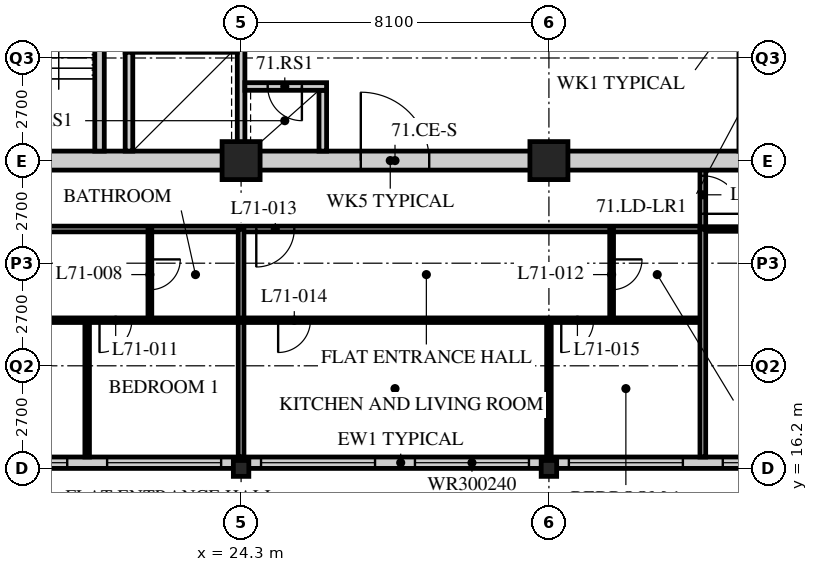
"""IFC4 building model, lengths in metres.
Left out: names, types, materials, properties, quantities, classifications, styles, units other than length and angle.
Written with IfcOpenShell. Run it as: python <this file> out.ifc"""

import sys

from ifc_helpers import new_model, si_unit, direction, frame, frame_2d, origin, origin_2d, place, context, subcontext, project, spatial, rectangle, hollow_rectangle, i_section, extrude, element, fill, save


model = new_model("IFC4")
c1 = context("Model", 3, precision=1e-05, world=origin(), true_north=direction((0.0, 1.0)))
c2 = subcontext(c1, "Body", "Model", "MODEL_VIEW")
j1 = project(units=[si_unit("LENGTHUNIT", "METRE"), si_unit("PLANEANGLEUNIT", "RADIAN")], contexts=[c1])
p1 = place(None, origin())
s1 = spatial("IfcSite", under=j1, at=p1, CompositionType="ELEMENT")
p2 = place(p1, origin())
s2 = spatial("IfcBuilding", under=s1, at=p2, CompositionType="ELEMENT")
p3 = place(p2, frame((0.0, 0.0, 277.5)))
s3 = spatial("IfcBuildingStorey", under=s2, at=p3, CompositionType="ELEMENT", Elevation=277.5)
p4 = place(p3, frame((24.3, 16.2, 0.0), z_axis=(0.0, 0.0, 1.0), x_axis=(1.0, 0.0, 0.0)))
e1 = element("IfcColumn", 1, at=p4, inside=s3, PredefinedType="COLUMN", context=c2, shape_type="SweptSolid", body=[
    extrude(i_section(OverallWidth=0.407, OverallDepth=0.419, WebThickness=0.031, FlangeThickness=0.049, FilletRadius=0.015, at=origin_2d()), origin(), (0.0, 0.0, 1.0), 3.9),
])
p5 = place(p3, frame((24.3, 24.3, 0.0), z_axis=(0.0, 0.0, 1.0), x_axis=(1.0, 0.0, 0.0)))
e2 = element("IfcColumn", 2, at=p5, inside=s3, PredefinedType="COLUMN", context=c2, shape_type="SweptSolid", body=[
    extrude(hollow_rectangle(XDim=1.0, YDim=1.0, WallThickness=0.1, at=origin_2d()), origin(), (0.0, 0.0, 1.0), 3.9),
])
p6 = place(p3, frame((32.4, 16.2, 0.0), z_axis=(0.0, 0.0, 1.0), x_axis=(1.0, 0.0, 0.0)))
e3 = element("IfcColumn", 3, at=p6, inside=s3, PredefinedType="COLUMN", context=c2, shape_type="SweptSolid", body=[
    extrude(i_section(OverallWidth=0.407, OverallDepth=0.419, WebThickness=0.031, FlangeThickness=0.049, FilletRadius=0.015, at=origin_2d()), origin(), (0.0, 0.0, 1.0), 3.9),
])
p7 = place(p3, frame((32.4, 24.3, 0.0), z_axis=(0.0, 0.0, 1.0), x_axis=(1.0, 0.0, 0.0)))
e4 = element("IfcColumn", 4, at=p7, inside=s3, PredefinedType="COLUMN", context=c2, shape_type="SweptSolid", body=[
    extrude(hollow_rectangle(XDim=1.0, YDim=1.0, WallThickness=0.1, at=origin_2d()), origin(), (0.0, 0.0, 1.0), 3.9),
])
p8 = place(p3, frame((8.4, 16.35, 0.0), z_axis=(0.0, 0.0, 1.0), x_axis=(1.0, 0.0, 0.0)))
e5 = element("IfcWall", 5, at=p8, inside=s3, PredefinedType="SOLIDWALL", context=c2, shape_type="SweptSolid", body=[
    extrude(rectangle(XDim=40.2, YDim=0.3, at=frame_2d((20.1, 0.0))), origin(), (0.0, 0.0, 1.0), 3.69),
])
p9 = place(p8, frame((0.225, 0.0, 0.6)))
e6 = element("IfcOpeningElement", 6, at=p9, cuts=e5, PredefinedType="OPENING", context=c2, shape_type="SweptSolid", body=[
    extrude(rectangle(XDim=3.0, YDim=2.4, at=frame_2d((1.5, 1.2))), frame((0.0, 0.16, 0.0), z_axis=(0.0, -1.0, 0.0), x_axis=(1.0, 0.0, 0.0)), (0.0, 0.0, 1.0), 0.32),
])
p10 = place(p8, frame((4.275, 0.0, 0.6)))
e7 = element("IfcOpeningElement", 7, at=p10, cuts=e5, PredefinedType="OPENING", context=c2, shape_type="SweptSolid", body=[
    extrude(rectangle(XDim=3.0, YDim=2.4, at=frame_2d((1.5, 1.2))), frame((0.0, 0.16, 0.0), z_axis=(0.0, -1.0, 0.0), x_axis=(1.0, 0.0, 0.0)), (0.0, 0.0, 1.0), 0.32),
])
p11 = place(p8, frame((8.325, 0.0, 0.6)))
e8 = element("IfcOpeningElement", 8, at=p11, cuts=e5, PredefinedType="OPENING", context=c2, shape_type="SweptSolid", body=[
    extrude(rectangle(XDim=3.0, YDim=2.4, at=frame_2d((1.5, 1.2))), frame((0.0, 0.16, 0.0), z_axis=(0.0, -1.0, 0.0), x_axis=(1.0, 0.0, 0.0)), (0.0, 0.0, 1.0), 0.32),
])
p12 = place(p8, frame((12.375, 0.0, 0.6)))
e9 = element("IfcOpeningElement", 9, at=p12, cuts=e5, PredefinedType="OPENING", context=c2, shape_type="SweptSolid", body=[
    extrude(rectangle(XDim=3.0, YDim=2.4, at=frame_2d((1.5, 1.2))), frame((0.0, 0.16, 0.0), z_axis=(0.0, -1.0, 0.0), x_axis=(1.0, 0.0, 0.0)), (0.0, 0.0, 1.0), 0.32),
])
p13 = place(p8, frame((16.425, 0.0, 0.6)))
e10 = element("IfcOpeningElement", 10, at=p13, cuts=e5, PredefinedType="OPENING", context=c2, shape_type="SweptSolid", body=[
    extrude(rectangle(XDim=3.0, YDim=2.4, at=frame_2d((1.5, 1.2))), frame((0.0, 0.16, 0.0), z_axis=(0.0, -1.0, 0.0), x_axis=(1.0, 0.0, 0.0)), (0.0, 0.0, 1.0), 0.32),
])
p14 = place(p8, frame((20.475, 0.0, 0.6)))
e11 = element("IfcOpeningElement", 11, at=p14, cuts=e5, PredefinedType="OPENING", context=c2, shape_type="SweptSolid", body=[
    extrude(rectangle(XDim=3.0, YDim=2.4, at=frame_2d((1.5, 1.2))), frame((0.0, 0.16, 0.0), z_axis=(0.0, -1.0, 0.0), x_axis=(1.0, 0.0, 0.0)), (0.0, 0.0, 1.0), 0.32),
])
p15 = place(p8, frame((24.525, 0.0, 0.6)))
e12 = element("IfcOpeningElement", 12, at=p15, cuts=e5, PredefinedType="OPENING", context=c2, shape_type="SweptSolid", body=[
    extrude(rectangle(XDim=3.0, YDim=2.4, at=frame_2d((1.5, 1.2))), frame((0.0, 0.16, 0.0), z_axis=(0.0, -1.0, 0.0), x_axis=(1.0, 0.0, 0.0)), (0.0, 0.0, 1.0), 0.32),
])
p16 = place(p8, frame((28.575, 0.0, 0.6)))
e13 = element("IfcOpeningElement", 13, at=p16, cuts=e5, PredefinedType="OPENING", context=c2, shape_type="SweptSolid", body=[
    extrude(rectangle(XDim=3.0, YDim=2.4, at=frame_2d((1.5, 1.2))), frame((0.0, 0.16, 0.0), z_axis=(0.0, -1.0, 0.0), x_axis=(1.0, 0.0, 0.0)), (0.0, 0.0, 1.0), 0.32),
])
p17 = place(p8, frame((32.625, 0.0, 0.6)))
e14 = element("IfcOpeningElement", 14, at=p17, cuts=e5, PredefinedType="OPENING", context=c2, shape_type="SweptSolid", body=[
    extrude(rectangle(XDim=3.0, YDim=2.4, at=frame_2d((1.5, 1.2))), frame((0.0, 0.16, 0.0), z_axis=(0.0, -1.0, 0.0), x_axis=(1.0, 0.0, 0.0)), (0.0, 0.0, 1.0), 0.32),
])
p18 = place(p8, frame((36.675, 0.0, 0.6)))
e15 = element("IfcOpeningElement", 15, at=p18, cuts=e5, PredefinedType="OPENING", context=c2, shape_type="SweptSolid", body=[
    extrude(rectangle(XDim=3.0, YDim=2.4, at=frame_2d((1.5, 1.2))), frame((0.0, 0.16, 0.0), z_axis=(0.0, -1.0, 0.0), x_axis=(1.0, 0.0, 0.0)), (0.0, 0.0, 1.0), 0.32),
])
p19 = place(p3, frame((12.15, 22.5, 0.0), z_axis=(0.0, 0.0, 1.0), x_axis=(1.0, 0.0, 0.0)))
e16 = element("IfcWall", 16, at=p19, inside=s3, PredefinedType="PARTITIONING", context=c2, shape_type="SweptSolid", body=[
    extrude(rectangle(XDim=24.3, YDim=0.15, at=frame_2d((12.15, 0.0))), origin(), (0.0, 0.0, 1.0), 3.69),
])
p20 = place(p19, frame((4.45, 0.0, 0.0)))
e17 = element("IfcOpeningElement", 17, at=p20, cuts=e16, PredefinedType="OPENING", context=c2, shape_type="SweptSolid", body=[
    extrude(rectangle(XDim=1.0, YDim=2.1, at=frame_2d((0.5, 1.05))), frame((0.0, 0.085, 0.0), z_axis=(0.0, -1.0, 0.0), x_axis=(1.0, 0.0, 0.0)), (0.0, 0.0, 1.0), 0.17),
])
p21 = place(p19, frame((12.55, 0.0, 0.0)))
e18 = element("IfcOpeningElement", 18, at=p21, cuts=e16, PredefinedType="OPENING", context=c2, shape_type="SweptSolid", body=[
    extrude(rectangle(XDim=1.0, YDim=2.1, at=frame_2d((0.5, 1.05))), frame((0.0, 0.085, 0.0), z_axis=(0.0, -1.0, 0.0), x_axis=(1.0, 0.0, 0.0)), (0.0, 0.0, 1.0), 0.17),
])
p22 = place(p19, frame((2.625, 0.0, 0.0)))
e19 = element("IfcOpeningElement", 19, at=p22, cuts=e16, PredefinedType="OPENING", context=c2, shape_type="SweptSolid", body=[
    extrude(rectangle(XDim=1.0, YDim=2.1, at=frame_2d((0.5, 1.05))), frame((0.0, 0.085, 0.0), z_axis=(0.0, -1.0, 0.0), x_axis=(1.0, 0.0, 0.0)), (0.0, 0.0, 1.0), 0.17),
])
p23 = place(p3, frame((36.45, 22.5, 0.0), z_axis=(0.0, 0.0, 1.0), x_axis=(0.0, 1.0, 0.0)))
e20 = element("IfcWall", 20, at=p23, inside=s3, PredefinedType="PARTITIONING", context=c2, shape_type="SweptSolid", body=[
    extrude(rectangle(XDim=1.8, YDim=0.15, at=frame_2d((0.9, 0.0))), origin(), (0.0, 0.0, 1.0), 3.69),
])
p24 = place(p23, frame((0.4, 0.0, 0.0)))
e21 = element("IfcOpeningElement", 21, at=p24, cuts=e20, PredefinedType="OPENING", context=c2, shape_type="SweptSolid", body=[
    extrude(rectangle(XDim=1.0, YDim=2.1, at=frame_2d((0.5, 1.05))), frame((0.0, 0.085, 0.0), z_axis=(0.0, -1.0, 0.0), x_axis=(1.0, 0.0, 0.0)), (0.0, 0.0, 1.0), 0.17),
])
p25 = place(p3, frame((21.9, 22.5, 0.0), z_axis=(0.0, 0.0, 1.0), x_axis=(0.0, -1.0, 0.0)))
e22 = element("IfcWall", 22, at=p25, inside=s3, PredefinedType="PARTITIONING", context=c2, shape_type="SweptSolid", body=[
    extrude(rectangle(XDim=2.4, YDim=0.1, at=frame_2d((1.2, 0.0))), origin(), (0.0, 0.0, 1.0), 3.69),
])
p26 = place(p25, frame((0.8, 0.0, 0.0)))
e23 = element("IfcOpeningElement", 23, at=p26, cuts=e22, PredefinedType="OPENING", context=c2, shape_type="SweptSolid", body=[
    extrude(rectangle(XDim=0.8, YDim=2.1, at=frame_2d((0.4, 1.05))), frame((0.0, 0.06, 0.0), z_axis=(0.0, -1.0, 0.0), x_axis=(1.0, 0.0, 0.0)), (0.0, 0.0, 1.0), 0.12),
])
p27 = place(p3, frame((20.25, 20.1, 0.0), z_axis=(0.0, 0.0, 1.0), x_axis=(0.0, -1.0, 0.0)))
e24 = element("IfcWall", 24, at=p27, inside=s3, PredefinedType="PARTITIONING", context=c2, shape_type="SweptSolid", body=[
    extrude(rectangle(XDim=3.6, YDim=0.12, at=frame_2d((1.8, 0.0))), origin(), (0.0, 0.0, 1.0), 3.69),
])
p28 = place(p3, frame((24.3, 22.5, 0.0), z_axis=(0.0, 0.0, 1.0), x_axis=(0.0, -1.0, 0.0)))
e25 = element("IfcWall", 25, at=p28, inside=s3, PredefinedType="PARTITIONING", context=c2, shape_type="SweptSolid", body=[
    extrude(rectangle(XDim=6.0, YDim=0.15, at=frame_2d((3.0, 0.0))), origin(), (0.0, 0.0, 1.0), 3.078),
])
p29 = place(p3, frame((34.05, 22.5, 0.0), z_axis=(0.0, 0.0, 1.0), x_axis=(0.0, -1.0, 0.0)))
e26 = element("IfcWall", 26, at=p29, inside=s3, PredefinedType="PARTITIONING", context=c2, shape_type="SweptSolid", body=[
    extrude(rectangle(XDim=2.4, YDim=0.1, at=frame_2d((1.2, 0.0))), origin(), (0.0, 0.0, 1.0), 3.69),
])
p30 = place(p29, frame((0.8, 0.0, 0.0)))
e27 = element("IfcOpeningElement", 27, at=p30, cuts=e26, PredefinedType="OPENING", context=c2, shape_type="SweptSolid", body=[
    extrude(rectangle(XDim=0.8, YDim=2.1, at=frame_2d((0.4, 1.05))), frame((0.0, 0.06, 0.0), z_axis=(0.0, -1.0, 0.0), x_axis=(1.0, 0.0, 0.0)), (0.0, 0.0, 1.0), 0.12),
])
p31 = place(p3, frame((32.4, 20.1, 0.0), z_axis=(0.0, 0.0, 1.0), x_axis=(0.0, -1.0, 0.0)))
e28 = element("IfcWall", 28, at=p31, inside=s3, PredefinedType="PARTITIONING", context=c2, shape_type="SweptSolid", body=[
    extrude(rectangle(XDim=3.6, YDim=0.12, at=frame_2d((1.8, 0.0))), origin(), (0.0, 0.0, 1.0), 3.078),
])
p32 = place(p3, frame((12.15, 20.1, 0.0), z_axis=(0.0, 0.0, 1.0), x_axis=(1.0, 0.0, 0.0)))
e29 = element("IfcWall", 29, at=p32, inside=s3, PredefinedType="PARTITIONING", context=c2, shape_type="SweptSolid", body=[
    extrude(rectangle(XDim=24.3, YDim=0.12, at=frame_2d((12.15, 0.0))), origin(), (0.0, 0.0, 1.0), 3.69),
])
p33 = place(p32, frame((5.025, 0.0, 0.0)))
e30 = element("IfcOpeningElement", 30, at=p33, cuts=e29, PredefinedType="OPENING", context=c2, shape_type="SweptSolid", body=[
    extrude(rectangle(XDim=0.85, YDim=2.1, at=frame_2d((0.425, 1.05))), frame((0.0, 0.07, 0.0), z_axis=(0.0, -1.0, 0.0), x_axis=(1.0, 0.0, 0.0)), (0.0, 0.0, 1.0), 0.14),
])
p34 = place(p32, frame((8.425, 0.0, 0.0)))
e31 = element("IfcOpeningElement", 31, at=p34, cuts=e29, PredefinedType="OPENING", context=c2, shape_type="SweptSolid", body=[
    extrude(rectangle(XDim=0.85, YDim=2.1, at=frame_2d((0.425, 1.05))), frame((0.0, 0.07, 0.0), z_axis=(0.0, -1.0, 0.0), x_axis=(1.0, 0.0, 0.0)), (0.0, 0.0, 1.0), 0.14),
])
p35 = place(p32, frame((13.125, 0.0, 0.0)))
e32 = element("IfcOpeningElement", 32, at=p35, cuts=e29, PredefinedType="OPENING", context=c2, shape_type="SweptSolid", body=[
    extrude(rectangle(XDim=0.85, YDim=2.1, at=frame_2d((0.425, 1.05))), frame((0.0, 0.07, 0.0), z_axis=(0.0, -1.0, 0.0), x_axis=(1.0, 0.0, 0.0)), (0.0, 0.0, 1.0), 0.14),
])
p36 = place(p32, frame((20.575, 0.0, 0.0)))
e33 = element("IfcOpeningElement", 33, at=p36, cuts=e29, PredefinedType="OPENING", context=c2, shape_type="SweptSolid", body=[
    extrude(rectangle(XDim=0.85, YDim=2.1, at=frame_2d((0.425, 1.05))), frame((0.0, 0.07, 0.0), z_axis=(0.0, -1.0, 0.0), x_axis=(1.0, 0.0, 0.0)), (0.0, 0.0, 1.0), 0.14),
])
p37 = place(p32, frame((2.725, 0.0, 0.0)))
e34 = element("IfcOpeningElement", 34, at=p37, cuts=e29, PredefinedType="OPENING", context=c2, shape_type="SweptSolid", body=[
    extrude(rectangle(XDim=0.85, YDim=2.1, at=frame_2d((0.425, 1.05))), frame((0.0, 0.07, 0.0), z_axis=(0.0, -1.0, 0.0), x_axis=(1.0, 0.0, 0.0)), (0.0, 0.0, 1.0), 0.14),
])
p38 = place(p3, frame((36.45, 22.5, 0.0), z_axis=(0.0, 0.0, 1.0), x_axis=(1.0, 0.0, 0.0)))
e35 = element("IfcWall", 35, at=p38, inside=s3, PredefinedType="PARTITIONING", context=c2, shape_type="SweptSolid", body=[
    extrude(rectangle(XDim=6.45, YDim=0.12, at=frame_2d((3.225, 0.0))), origin(), (0.0, 0.0, 1.0), 3.69),
])
p39 = place(p38, frame((2.8, 0.0, 0.0)))
e36 = element("IfcOpeningElement", 36, at=p39, cuts=e35, PredefinedType="OPENING", context=c2, shape_type="SweptSolid", body=[
    extrude(rectangle(XDim=0.85, YDim=2.1, at=frame_2d((0.425, 1.05))), frame((0.0, 0.07, 0.0), z_axis=(0.0, -1.0, 0.0), x_axis=(1.0, 0.0, 0.0)), (0.0, 0.0, 1.0), 0.14),
])
p40 = place(p3, frame((36.45, 16.5, 0.0), z_axis=(0.0, 0.0, 1.0), x_axis=(0.0, 1.0, 0.0)))
e37 = element("IfcWall", 37, at=p40, inside=s3, PredefinedType="PARTITIONING", context=c2, shape_type="SweptSolid", body=[
    extrude(rectangle(XDim=6.0, YDim=0.15, at=frame_2d((3.0, 0.0))), origin(), (0.0, 0.0, 1.0), 3.69),
])
p41 = place(p3, frame((15.95, 24.3, 0.0), z_axis=(0.0, 0.0, 1.0), x_axis=(1.0, 0.0, 0.0)))
e38 = element("IfcWall", 38, at=p41, inside=s3, PredefinedType="SOLIDWALL", context=c2, shape_type="SweptSolid", body=[
    extrude(rectangle(XDim=24.55, YDim=0.5, at=frame_2d((12.275, 0.0))), origin(), (0.0, 0.0, 1.0), 3.04),
])
p42 = place(p41, frame((11.5, 0.0, 0.0)))
e39 = element("IfcOpeningElement", 39, at=p42, cuts=e38, PredefinedType="OPENING", context=c2, shape_type="SweptSolid", body=[
    extrude(rectangle(XDim=1.8, YDim=2.4, at=frame_2d((0.9, 1.2))), frame((0.0, 0.26, 0.0), z_axis=(0.0, -1.0, 0.0), x_axis=(1.0, 0.0, 0.0)), (0.0, 0.0, 1.0), 0.52),
])
p43 = place(p3, frame((24.3, 24.55, 0.0), z_axis=(0.0, 0.0, 1.0), x_axis=(0.0, 1.0, 0.0)))
e40 = element("IfcWall", 40, at=p43, inside=s3, PredefinedType="SOLIDWALL", context=c2, shape_type="SweptSolid", body=[
    extrude(rectangle(XDim=7.75, YDim=0.2, at=frame_2d((3.875, 0.0))), origin(), (0.0, 0.0, 1.0), 3.078),
])
p44 = place(p43, frame((4.6, 0.0, 0.0)))
e41 = element("IfcOpeningElement", 41, at=p44, cuts=e40, PredefinedType="OPENING", context=c2, shape_type="SweptSolid", body=[
    extrude(rectangle(XDim=1.2, YDim=2.1, at=frame_2d((0.6, 1.05))), frame((0.0, 0.11, 0.0), z_axis=(0.0, -1.0, 0.0), x_axis=(1.0, 0.0, 0.0)), (0.0, 0.0, 1.0), 0.22),
])
p45 = place(p3, frame((20.575, 24.55, 0.0), z_axis=(0.0, 0.0, 1.0), x_axis=(0.0, 1.0, 0.0)))
e42 = element("IfcWall", 42, at=p45, inside=s3, PredefinedType="SOLIDWALL", context=c2, shape_type="SweptSolid", body=[
    extrude(rectangle(XDim=7.75, YDim=0.25, at=frame_2d((3.875, 0.0))), origin(), (0.0, 0.0, 1.0), 3.69),
])
p46 = place(p45, frame((6.2, 0.0, 0.0)))
e43 = element("IfcOpeningElement", 43, at=p46, cuts=e42, PredefinedType="OPENING", context=c2, shape_type="SweptSolid", body=[
    extrude(rectangle(XDim=1.2, YDim=2.1, at=frame_2d((0.6, 1.05))), frame((0.0, 0.135, 0.0), z_axis=(0.0, -1.0, 0.0), x_axis=(1.0, 0.0, 0.0)), (0.0, 0.0, 1.0), 0.27),
])
p47 = place(p3, frame((21.35, 24.55, 0.0), z_axis=(0.0, 0.0, 1.0), x_axis=(0.0, 1.0, 0.0)))
e44 = element("IfcWall", 44, at=p47, inside=s3, PredefinedType="SOLIDWALL", context=c2, shape_type="SweptSolid", body=[
    extrude(rectangle(XDim=2.6, YDim=0.2, at=frame_2d((1.3, 0.0))), origin(), (0.0, 0.0, 1.0), 3.69),
])
p48 = place(p3, frame((26.45, 24.55, 0.0), z_axis=(0.0, 0.0, 1.0), x_axis=(0.0, 1.0, 0.0)))
e45 = element("IfcWall", 45, at=p48, inside=s3, PredefinedType="SOLIDWALL", context=c2, shape_type="SweptSolid", body=[
    extrude(rectangle(XDim=1.6, YDim=0.2, at=frame_2d((0.8, 0.0))), origin(), (0.0, 0.0, 1.0), 3.69),
])
p49 = place(p3, frame((24.4, 26.25, 0.0), z_axis=(0.0, 0.0, 1.0), x_axis=(1.0, 0.0, 0.0)))
e46 = element("IfcWall", 46, at=p49, inside=s3, PredefinedType="SOLIDWALL", context=c2, shape_type="SweptSolid", body=[
    extrude(rectangle(XDim=2.15, YDim=0.2, at=frame_2d((1.075, 0.0))), origin(), (0.0, 0.0, 1.0), 3.69),
])
p50 = place(p49, frame((0.6, 0.0, 0.0)))
e47 = element("IfcOpeningElement", 47, at=p50, cuts=e46, PredefinedType="OPENING", context=c2, shape_type="SweptSolid", body=[
    extrude(rectangle(XDim=0.9, YDim=2.1, at=frame_2d((0.45, 1.05))), frame((0.0, 0.11, 0.0), z_axis=(0.0, -1.0, 0.0), x_axis=(1.0, 0.0, 0.0)), (0.0, 0.0, 1.0), 0.22),
])
p51 = place(p11, origin())
e48 = element("IfcWindow", 48, at=p51, inside=s3, PartitioningType="SINGLE_PANEL", PredefinedType="WINDOW", context=c2, shape_type="SweptSolid", body=[
    extrude(rectangle(XDim=3.0, YDim=2.4, at=frame_2d((1.5, 1.2))), frame((0.0, 0.03, 0.0), z_axis=(0.0, -1.0, 0.0), x_axis=(1.0, 0.0, 0.0)), (0.0, 0.0, 1.0), 0.06),
])
fill(e8, e48)
p52 = place(p12, origin())
e49 = element("IfcWindow", 49, at=p52, inside=s3, PartitioningType="SINGLE_PANEL", PredefinedType="WINDOW", context=c2, shape_type="SweptSolid", body=[
    extrude(rectangle(XDim=3.0, YDim=2.4, at=frame_2d((1.5, 1.2))), frame((0.0, 0.03, 0.0), z_axis=(0.0, -1.0, 0.0), x_axis=(1.0, 0.0, 0.0)), (0.0, 0.0, 1.0), 0.06),
])
fill(e9, e49)
p53 = place(p13, origin())
e50 = element("IfcWindow", 50, at=p53, inside=s3, PartitioningType="SINGLE_PANEL", PredefinedType="WINDOW", context=c2, shape_type="SweptSolid", body=[
    extrude(rectangle(XDim=3.0, YDim=2.4, at=frame_2d((1.5, 1.2))), frame((0.0, 0.03, 0.0), z_axis=(0.0, -1.0, 0.0), x_axis=(1.0, 0.0, 0.0)), (0.0, 0.0, 1.0), 0.06),
])
fill(e10, e50)
p54 = place(p14, origin())
e51 = element("IfcWindow", 51, at=p54, inside=s3, PartitioningType="SINGLE_PANEL", PredefinedType="WINDOW", context=c2, shape_type="SweptSolid", body=[
    extrude(rectangle(XDim=3.0, YDim=2.4, at=frame_2d((1.5, 1.2))), frame((0.0, 0.03, 0.0), z_axis=(0.0, -1.0, 0.0), x_axis=(1.0, 0.0, 0.0)), (0.0, 0.0, 1.0), 0.06),
])
fill(e11, e51)
p55 = place(p15, origin())
e52 = element("IfcWindow", 52, at=p55, inside=s3, PartitioningType="SINGLE_PANEL", PredefinedType="WINDOW", context=c2, shape_type="SweptSolid", body=[
    extrude(rectangle(XDim=3.0, YDim=2.4, at=frame_2d((1.5, 1.2))), frame((0.0, 0.03, 0.0), z_axis=(0.0, -1.0, 0.0), x_axis=(1.0, 0.0, 0.0)), (0.0, 0.0, 1.0), 0.06),
])
fill(e12, e52)
p56 = place(p16, origin())
e53 = element("IfcWindow", 53, at=p56, inside=s3, PartitioningType="SINGLE_PANEL", PredefinedType="WINDOW", context=c2, shape_type="SweptSolid", body=[
    extrude(rectangle(XDim=3.0, YDim=2.4, at=frame_2d((1.5, 1.2))), frame((0.0, 0.03, 0.0), z_axis=(0.0, -1.0, 0.0), x_axis=(1.0, 0.0, 0.0)), (0.0, 0.0, 1.0), 0.06),
])
fill(e13, e53)
p57 = place(p26, origin())
e54 = element("IfcDoor", 54, at=p57, inside=s3, OperationType="SINGLE_SWING_LEFT", PredefinedType="DOOR", context=c2, shape_type="SweptSolid", body=[
    extrude(rectangle(XDim=0.8, YDim=2.1, at=frame_2d((0.4, 1.05))), frame((0.0, 0.025, 0.0), z_axis=(0.0, -1.0, 0.0), x_axis=(1.0, 0.0, 0.0)), (0.0, 0.0, 1.0), 0.05),
])
fill(e23, e54)
p58 = place(p34, origin())
e55 = element("IfcDoor", 55, at=p58, inside=s3, OperationType="SINGLE_SWING_RIGHT", PredefinedType="DOOR", context=c2, shape_type="SweptSolid", body=[
    extrude(rectangle(XDim=0.85, YDim=2.1, at=frame_2d((0.425, 1.05))), frame((0.0, 0.025, 0.0), z_axis=(0.0, -1.0, 0.0), x_axis=(1.0, 0.0, 0.0)), (0.0, 0.0, 1.0), 0.05),
])
fill(e31, e55)
p59 = place(p30, origin())
e56 = element("IfcDoor", 56, at=p59, inside=s3, OperationType="SINGLE_SWING_LEFT", PredefinedType="DOOR", context=c2, shape_type="SweptSolid", body=[
    extrude(rectangle(XDim=0.8, YDim=2.1, at=frame_2d((0.4, 1.05))), frame((0.0, 0.025, 0.0), z_axis=(0.0, -1.0, 0.0), x_axis=(1.0, 0.0, 0.0)), (0.0, 0.0, 1.0), 0.05),
])
fill(e27, e56)
p60 = place(p21, origin())
e57 = element("IfcDoor", 57, at=p60, inside=s3, OperationType="SINGLE_SWING_RIGHT", PredefinedType="DOOR", context=c2, shape_type="SweptSolid", body=[
    extrude(rectangle(XDim=1.0, YDim=2.1, at=frame_2d((0.5, 1.05))), frame((0.0, 0.025, 0.0), z_axis=(0.0, -1.0, 0.0), x_axis=(1.0, 0.0, 0.0)), (0.0, 0.0, 1.0), 0.05),
])
fill(e18, e57)
p61 = place(p35, origin())
e58 = element("IfcDoor", 58, at=p61, inside=s3, OperationType="SINGLE_SWING_RIGHT", PredefinedType="DOOR", context=c2, shape_type="SweptSolid", body=[
    extrude(rectangle(XDim=0.85, YDim=2.1, at=frame_2d((0.425, 1.05))), frame((0.0, 0.025, 0.0), z_axis=(0.0, -1.0, 0.0), x_axis=(1.0, 0.0, 0.0)), (0.0, 0.0, 1.0), 0.05),
])
fill(e32, e58)
p62 = place(p36, origin())
e59 = element("IfcDoor", 59, at=p62, inside=s3, OperationType="SINGLE_SWING_RIGHT", PredefinedType="DOOR", context=c2, shape_type="SweptSolid", body=[
    extrude(rectangle(XDim=0.85, YDim=2.1, at=frame_2d((0.425, 1.05))), frame((0.0, 0.025, 0.0), z_axis=(0.0, -1.0, 0.0), x_axis=(1.0, 0.0, 0.0)), (0.0, 0.0, 1.0), 0.05),
])
fill(e33, e59)
p63 = place(p24, origin())
e60 = element("IfcDoor", 60, at=p63, inside=s3, OperationType="SINGLE_SWING_RIGHT", PredefinedType="DOOR", context=c2, shape_type="SweptSolid", body=[
    extrude(rectangle(XDim=1.0, YDim=2.1, at=frame_2d((0.5, 1.05))), frame((0.0, 0.025, 0.0), z_axis=(0.0, -1.0, 0.0), x_axis=(1.0, 0.0, 0.0)), (0.0, 0.0, 1.0), 0.05),
])
fill(e21, e60)
p64 = place(p50, origin())
e61 = element("IfcDoor", 61, at=p64, inside=s3, OperationType="SINGLE_SWING_LEFT", PredefinedType="DOOR", context=c2, shape_type="SweptSolid", body=[
    extrude(rectangle(XDim=0.9, YDim=2.1, at=frame_2d((0.45, 1.05))), frame((0.0, 0.025, 0.0), z_axis=(0.0, -1.0, 0.0), x_axis=(1.0, 0.0, 0.0)), (0.0, 0.0, 1.0), 0.05),
])
fill(e47, e61)
p65 = place(p42, origin())
e62 = element("IfcDoor", 62, at=p65, inside=s3, OperationType="DOUBLE_DOOR_SINGLE_SWING", PredefinedType="DOOR", context=c2, shape_type="SweptSolid", body=[
    extrude(rectangle(XDim=1.8, YDim=2.4, at=frame_2d((0.9, 1.2))), frame((0.0, 0.025, 0.0), z_axis=(0.0, -1.0, 0.0), x_axis=(1.0, 0.0, 0.0)), (0.0, 0.0, 1.0), 0.05),
])
fill(e39, e62)
save(model, sys.argv[1])
